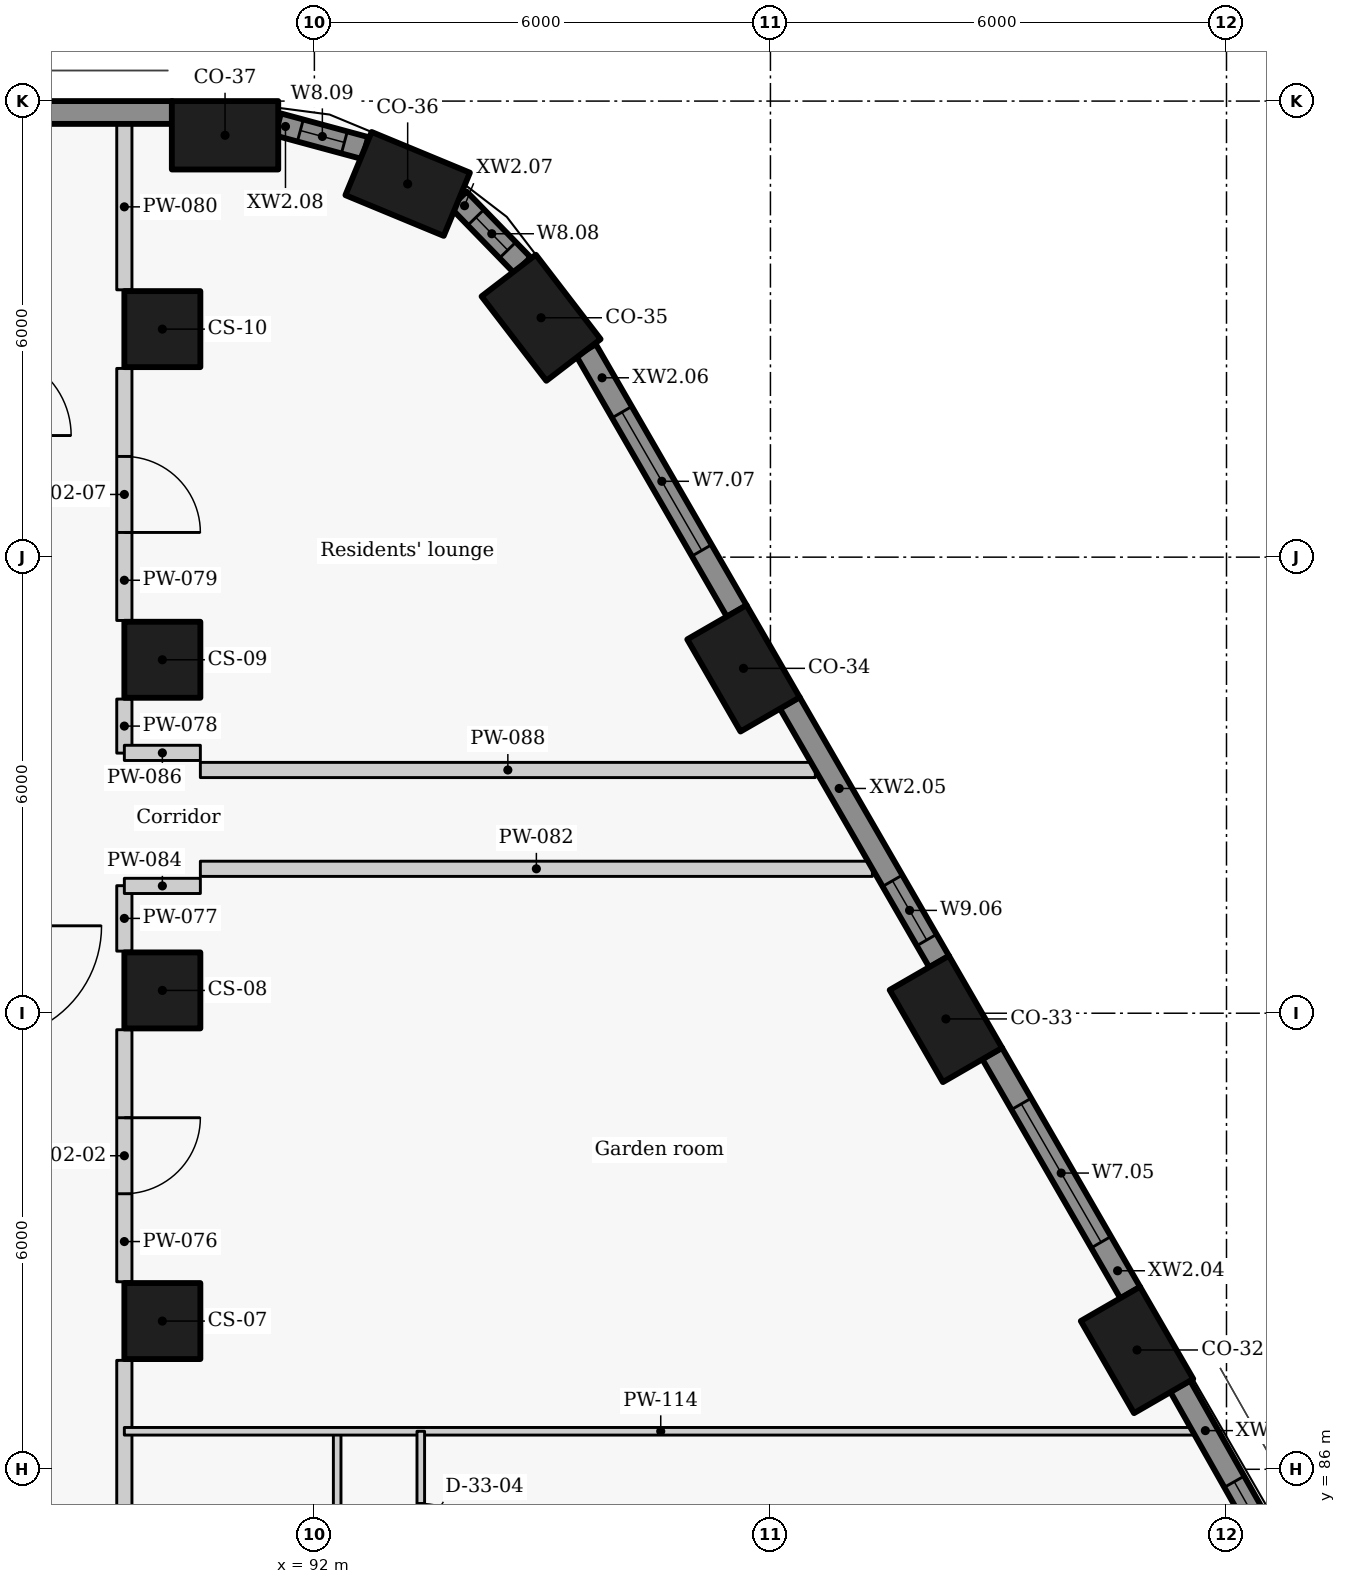
"""IFC4 building model, lengths in metres.
Left out: names, types, materials, properties, quantities, classifications, styles, units other than length and angle.
Written with IfcOpenShell. Run it as: python <this file> out.ifc"""

import sys

from ifc_helpers import new_model, si_unit, direction, frame, frame_2d, origin, origin_2d, place, context, subcontext, project, spatial, rectangle, extrude, element, fill, save


model = new_model("IFC4")
c1 = context("Model", 3, precision=1e-05, world=origin(), true_north=direction((0.0, 1.0)))
c2 = subcontext(c1, "Body", "Model", "MODEL_VIEW")
j1 = project(units=[si_unit("LENGTHUNIT", "METRE"), si_unit("PLANEANGLEUNIT", "RADIAN")], contexts=[c1])
p1 = place(None, origin())
s1 = spatial("IfcSite", under=j1, at=p1, CompositionType="ELEMENT")
p2 = place(p1, origin())
s2 = spatial("IfcBuilding", under=s1, at=p2, CompositionType="ELEMENT")
p3 = place(p2, frame((0.0, 0.0, 97.5)))
s3 = spatial("IfcBuildingStorey", under=s2, at=p3, CompositionType="ELEMENT", Elevation=97.5)
for number, where, z_axis, x_axis in (
    (1, (102.823, 87.57, 0.0), (0.0, 0.0, 1.0), (-0.5, 0.866, 0.0)),
    (2, (100.308, 91.925, 0.0), (0.0, 0.0, 1.0), (-0.5, 0.866, 0.0)),
    (3, (97.646, 96.537, 0.0), (0.0, 0.0, 1.0), (-0.5, 0.866, 0.0)),
    (4, (94.982, 101.149, 0.0), (0.0, 0.0, 1.0), (-0.609, 0.793, 0.0)),
    (5, (93.227, 102.91, 0.0), (0.0, 0.0, 1.0), (-0.924, 0.383, 0.0)),
    (6, (90.825, 103.55, 0.0), (0.0, 0.0, 1.0), (-1.0, 0.0, 0.0)),
):
    element("IfcColumn", number, at=place(p3, frame(where, z_axis=z_axis, x_axis=x_axis)), inside=s3, PredefinedType="COLUMN", context=c2, shape_type="SweptSolid", body=[
        extrude(rectangle(XDim=1.4, YDim=0.9, at=origin_2d()), origin(), (0.0, 0.0, 1.0), 3.3),
    ])
for number, where, z_axis, x_axis in (
    (7, (90.0, 87.95, 0.0), (0.0, 0.0, 1.0), (0.0, 1.0, 0.0)),
    (8, (90.0, 92.3, 0.0), (0.0, 0.0, 1.0), (0.0, 1.0, 0.0)),
    (9, (90.0, 96.65, 0.0), (0.0, 0.0, 1.0), (0.0, 1.0, 0.0)),
    (10, (90.0, 101.0, 0.0), (0.0, 0.0, 1.0), (0.0, 1.0, 0.0)),
):
    element("IfcColumn", number, at=place(p3, frame(where, z_axis=z_axis, x_axis=x_axis)), inside=s3, PredefinedType="COLUMN", context=c2, shape_type="SweptSolid", body=[
        extrude(rectangle(XDim=1.0, YDim=1.0, at=origin_2d()), origin(), (0.0, 0.0, 1.0), 3.3),
    ])
p4 = place(p3, frame((106.186, 82.153, 0.0), z_axis=(0.0, 0.0, 1.0), x_axis=(-0.492456858874, 0.870336855561, 0.0)))
e11 = element("IfcWall", 11, at=p4, inside=s3, PredefinedType="SOLIDWALL", context=c2, shape_type="SweptSolid", body=[
    extrude(rectangle(XDim=5.677, YDim=0.3, at=frame_2d((2.838, 0.0))), origin(), (0.0, 0.0, 1.0), 2.425),
])
p5 = place(p4, frame((0.763, 0.0, 0.9)))
e12 = element("IfcOpeningElement", 12, at=p5, cuts=e11, PredefinedType="OPENING", context=c2, shape_type="SweptSolid", body=[
    extrude(rectangle(XDim=0.9, YDim=1.1, at=frame_2d((0.45, 0.55))), frame((0.0, 0.16, 0.0), z_axis=(0.0, -1.0, 0.0), x_axis=(1.0, 0.0, 0.0)), (0.0, 0.0, 1.0), 0.32),
])
p6 = place(p4, frame((2.732, 0.0, 0.9)))
e13 = element("IfcOpeningElement", 13, at=p6, cuts=e11, PredefinedType="OPENING", context=c2, shape_type="SweptSolid", body=[
    extrude(rectangle(XDim=1.5, YDim=1.1, at=frame_2d((0.75, 0.55))), frame((0.0, 0.16, 0.0), z_axis=(0.0, -1.0, 0.0), x_axis=(1.0, 0.0, 0.0)), (0.0, 0.0, 1.0), 0.32),
])
p7 = place(p3, frame((102.735, 88.323, 0.0), z_axis=(0.0, 0.0, 1.0), x_axis=(-0.500009139881, 0.866020126807, 0.0)))
e14 = element("IfcWall", 14, at=p7, inside=s3, PredefinedType="SOLIDWALL", context=c2, shape_type="SweptSolid", body=[
    extrude(rectangle(XDim=3.637, YDim=0.3, at=frame_2d((1.818, 0.0))), origin(), (0.0, 0.0, 1.0), 2.425),
])
p8 = place(p7, frame((0.768, 0.0, 0.9)))
e15 = element("IfcOpeningElement", 15, at=p8, cuts=e14, PredefinedType="OPENING", context=c2, shape_type="SweptSolid", body=[
    extrude(rectangle(XDim=2.1, YDim=1.1, at=frame_2d((1.05, 0.55))), frame((0.0, 0.16, 0.0), z_axis=(0.0, -1.0, 0.0), x_axis=(1.0, 0.0, 0.0)), (0.0, 0.0, 1.0), 0.32),
])
p9 = place(p3, frame((100.22, 92.677, 0.0), z_axis=(0.0, 0.0, 1.0), x_axis=(-0.499957037901, 0.866050206543, 0.0)))
e16 = element("IfcWall", 16, at=p9, inside=s3, PredefinedType="SOLIDWALL", context=c2, shape_type="SweptSolid", body=[
    extrude(rectangle(XDim=3.934, YDim=0.3, at=frame_2d((1.967, 0.0))), origin(), (0.0, 0.0, 1.0), 2.425),
])
p10 = place(p9, frame((0.33, 0.0, 0.9)))
e17 = element("IfcOpeningElement", 17, at=p10, cuts=e16, PredefinedType="OPENING", context=c2, shape_type="SweptSolid", body=[
    extrude(rectangle(XDim=0.9, YDim=1.1, at=frame_2d((0.45, 0.55))), frame((0.0, 0.16, 0.0), z_axis=(0.0, -1.0, 0.0), x_axis=(1.0, 0.0, 0.0)), (0.0, 0.0, 1.0), 0.32),
])
p11 = place(p3, frame((97.557, 97.29, 0.0), z_axis=(0.0, 0.0, 1.0), x_axis=(-0.500043828347, 0.866000097998, 0.0)))
e18 = element("IfcWall", 18, at=p11, inside=s3, PredefinedType="SOLIDWALL", context=c2, shape_type="SweptSolid", body=[
    extrude(rectangle(XDim=3.968, YDim=0.3, at=frame_2d((1.984, 0.0))), origin(), (0.0, 0.0, 1.0), 2.425),
])
p12 = place(p11, frame((0.922, 0.0, 0.9)))
e19 = element("IfcOpeningElement", 19, at=p12, cuts=e18, PredefinedType="OPENING", context=c2, shape_type="SweptSolid", body=[
    extrude(rectangle(XDim=2.1, YDim=1.1, at=frame_2d((1.05, 0.55))), frame((0.0, 0.16, 0.0), z_axis=(0.0, -1.0, 0.0), x_axis=(1.0, 0.0, 0.0)), (0.0, 0.0, 1.0), 0.32),
])
p13 = place(p3, frame((94.738, 101.839, 0.0), z_axis=(0.0, 0.0, 1.0), x_axis=(-0.697032216592, 0.717039809936, 0.0)))
e20 = element("IfcWall", 20, at=p13, inside=s3, PredefinedType="SOLIDWALL", context=c2, shape_type="SweptSolid", body=[
    extrude(rectangle(XDim=1.208, YDim=0.3, at=frame_2d((0.604, 0.0))), origin(), (0.0, 0.0, 1.0), 2.425),
])
p14 = place(p13, frame((0.279, 0.0, 0.9)))
e21 = element("IfcOpeningElement", 21, at=p14, cuts=e20, PredefinedType="OPENING", context=c2, shape_type="SweptSolid", body=[
    extrude(rectangle(XDim=0.6, YDim=1.1, at=frame_2d((0.3, 0.55))), frame((0.0, 0.16, 0.0), z_axis=(0.0, -1.0, 0.0), x_axis=(1.0, 0.0, 0.0)), (0.0, 0.0, 1.0), 0.32),
])
p15 = place(p3, frame((92.669, 103.382, 0.0), z_axis=(0.0, 0.0, 1.0), x_axis=(-0.965278131029, 0.261224290136, 0.0)))
e22 = element("IfcWall", 22, at=p15, inside=s3, PredefinedType="SOLIDWALL", context=c2, shape_type="SweptSolid", body=[
    extrude(rectangle(XDim=1.19, YDim=0.3, at=frame_2d((0.595, 0.0))), origin(), (0.0, 0.0, 1.0), 2.425),
])
p16 = place(p15, frame((0.285, 0.0, 0.9)))
e23 = element("IfcOpeningElement", 23, at=p16, cuts=e22, PredefinedType="OPENING", context=c2, shape_type="SweptSolid", body=[
    extrude(rectangle(XDim=0.6, YDim=1.1, at=frame_2d((0.3, 0.55))), frame((0.0, 0.16, 0.0), z_axis=(0.0, -1.0, 0.0), x_axis=(1.0, 0.0, 0.0)), (0.0, 0.0, 1.0), 0.32),
])
p17 = place(p3, frame((90.129, 103.85, 0.0), z_axis=(0.0, 0.0, 1.0), x_axis=(-1.0, 0.0, 0.0)))
e24 = element("IfcWall", 24, at=p17, inside=s3, PredefinedType="SOLIDWALL", context=c2, shape_type="SweptSolid", body=[
    extrude(rectangle(XDim=20.291, YDim=0.3, at=frame_2d((10.146, 0.0))), origin(), (0.0, 0.0, 1.0), 2.425),
])
p18 = place(p3, frame((89.5, 83.167, 0.0), z_axis=(0.0, 0.0, 1.0), x_axis=(0.0, 1.0, 0.0)))
e25 = element("IfcWall", 25, at=p18, inside=s3, PredefinedType="PARTITIONING", context=c2, shape_type="SweptSolid", body=[
    extrude(rectangle(XDim=4.266, YDim=0.2, at=frame_2d((2.133, 0.0))), origin(), (0.0, 0.0, 1.0), 3.025),
])
p19 = place(p3, frame((89.5, 91.783, 0.0), z_axis=(0.0, 0.0, 1.0), x_axis=(0.0, -1.0, 0.0)))
e26 = element("IfcWall", 26, at=p19, inside=s3, PredefinedType="PARTITIONING", context=c2, shape_type="SweptSolid", body=[
    extrude(rectangle(XDim=3.316, YDim=0.2, at=frame_2d((1.658, 0.0))), origin(), (0.0, 0.0, 1.0), 3.025),
])
p20 = place(p19, frame((1.158, 0.0, 0.0)))
e27 = element("IfcOpeningElement", 27, at=p20, cuts=e26, PredefinedType="OPENING", context=c2, shape_type="SweptSolid", body=[
    extrude(rectangle(XDim=1.0, YDim=2.1, at=frame_2d((0.5, 1.05))), frame((0.0, 0.11, 0.0), z_axis=(0.0, -1.0, 0.0), x_axis=(1.0, 0.0, 0.0)), (0.0, 0.0, 1.0), 0.22),
])
p21 = place(p3, frame((89.5, 92.817, 0.0), z_axis=(0.0, 0.0, 1.0), x_axis=(0.0, 1.0, 0.0)))
e28 = element("IfcWall", 28, at=p21, inside=s3, PredefinedType="PARTITIONING", context=c2, shape_type="SweptSolid", body=[
    extrude(rectangle(XDim=0.861, YDim=0.2, at=frame_2d((0.431, 0.0))), origin(), (0.0, 0.0, 1.0), 3.025),
])
p22 = place(p3, frame((89.5, 95.422, 0.0), z_axis=(0.0, 0.0, 1.0), x_axis=(0.0, 1.0, 0.0)))
e29 = element("IfcWall", 29, at=p22, inside=s3, PredefinedType="PARTITIONING", context=c2, shape_type="SweptSolid", body=[
    extrude(rectangle(XDim=0.711, YDim=0.2, at=frame_2d((0.355, 0.0))), origin(), (0.0, 0.0, 1.0), 3.025),
])
p23 = place(p3, frame((89.5, 100.483, 0.0), z_axis=(0.0, 0.0, 1.0), x_axis=(0.0, -1.0, 0.0)))
e30 = element("IfcWall", 30, at=p23, inside=s3, PredefinedType="PARTITIONING", context=c2, shape_type="SweptSolid", body=[
    extrude(rectangle(XDim=3.316, YDim=0.2, at=frame_2d((1.658, 0.0))), origin(), (0.0, 0.0, 1.0), 3.025),
])
p24 = place(p23, frame((1.158, 0.0, 0.0)))
e31 = element("IfcOpeningElement", 31, at=p24, cuts=e30, PredefinedType="OPENING", context=c2, shape_type="SweptSolid", body=[
    extrude(rectangle(XDim=1.0, YDim=2.1, at=frame_2d((0.5, 1.05))), frame((0.0, 0.11, 0.0), z_axis=(0.0, -1.0, 0.0), x_axis=(1.0, 0.0, 0.0)), (0.0, 0.0, 1.0), 0.22),
])
p25 = place(p3, frame((89.5, 101.517, 0.0), z_axis=(0.0, 0.0, 1.0), x_axis=(0.0, 1.0, 0.0)))
e32 = element("IfcWall", 32, at=p25, inside=s3, PredefinedType="PARTITIONING", context=c2, shape_type="SweptSolid", body=[
    extrude(rectangle(XDim=2.183, YDim=0.2, at=frame_2d((1.091, 0.0))), origin(), (0.0, 0.0, 1.0), 3.025),
])
p26 = place(p3, frame((90.5, 93.9, 0.0), z_axis=(0.0, 0.0, 1.0), x_axis=(1.0, 0.0, 0.0)))
e33 = element("IfcWall", 33, at=p26, inside=s3, PredefinedType="PARTITIONING", context=c2, shape_type="SweptSolid", body=[
    extrude(rectangle(XDim=8.841, YDim=0.2, at=frame_2d((4.421, 0.0))), origin(), (0.0, 0.0, 1.0), 2.405),
])
for number, where, z_axis, x_axis in (
    (34, (89.5, 93.675, 0.0), (0.0, 0.0, 1.0), (1.0, 0.0, 0.0)),
    (35, (89.5, 95.425, 0.0), (0.0, 0.0, 1.0), (1.0, 0.0, 0.0)),
):
    element("IfcWall", number, at=place(p3, frame(where, z_axis=z_axis, x_axis=x_axis)), inside=s3, PredefinedType="PARTITIONING", context=c2, shape_type="SweptSolid", body=[
        extrude(rectangle(XDim=1.0, YDim=0.2, at=frame_2d((0.5, 0.0))), origin(), (0.0, 0.0, 1.0), 2.505),
    ])
p27 = place(p3, frame((90.5, 95.2, 0.0), z_axis=(0.0, 0.0, 1.0), x_axis=(1.0, 0.0, 0.0)))
e36 = element("IfcWall", 36, at=p27, inside=s3, PredefinedType="PARTITIONING", context=c2, shape_type="SweptSolid", body=[
    extrude(rectangle(XDim=8.091, YDim=0.2, at=frame_2d((4.045, 0.0))), origin(), (0.0, 0.0, 1.0), 2.405),
])
p28 = place(p3, frame((92.3, 79.5, 0.0), z_axis=(0.0, 0.0, 1.0), x_axis=(0.0, 1.0, 0.0)))
e37 = element("IfcWall", 37, at=p28, inside=s3, PredefinedType="PARTITIONING", context=c2, shape_type="SweptSolid", body=[
    extrude(rectangle(XDim=7.0, YDim=0.1, at=frame_2d((3.5, 0.0))), origin(), (0.0, 0.0, 1.0), 3.025),
])
p29 = place(p28, frame((1.166, 0.0, 0.0)))
e38 = element("IfcOpeningElement", 38, at=p29, cuts=e37, PredefinedType="OPENING", context=c2, shape_type="SweptSolid", body=[
    extrude(rectangle(XDim=0.85, YDim=2.1, at=frame_2d((0.425, 1.05))), frame((0.0, 0.06, 0.0), z_axis=(0.0, -1.0, 0.0), x_axis=(1.0, 0.0, 0.0)), (0.0, 0.0, 1.0), 0.12),
])
p30 = place(p28, frame((4.641, 0.0, 0.0)))
e39 = element("IfcOpeningElement", 39, at=p30, cuts=e37, PredefinedType="OPENING", context=c2, shape_type="SweptSolid", body=[
    extrude(rectangle(XDim=0.9, YDim=2.1, at=frame_2d((0.45, 1.05))), frame((0.0, 0.06, 0.0), z_axis=(0.0, -1.0, 0.0), x_axis=(1.0, 0.0, 0.0)), (0.0, 0.0, 1.0), 0.12),
])
p31 = place(p3, frame((89.5, 86.5, 0.0), z_axis=(0.0, 0.0, 1.0), x_axis=(1.0, 0.0, 0.0)))
e40 = element("IfcWall", 40, at=p31, inside=s3, PredefinedType="PARTITIONING", context=c2, shape_type="SweptSolid", body=[
    extrude(rectangle(XDim=14.114, YDim=0.1, at=frame_2d((7.057, 0.0))), origin(), (0.0, 0.0, 1.0), 2.405),
])
p32 = place(p3, frame((93.4, 86.5, 0.0), z_axis=(0.0, 0.0, 1.0), x_axis=(0.0, -1.0, 0.0)))
e41 = element("IfcWall", 41, at=p32, inside=s3, PredefinedType="PARTITIONING", context=c2, shape_type="SweptSolid", body=[
    extrude(rectangle(XDim=9.6, YDim=0.1, at=frame_2d((4.8, 0.0))), origin(), (0.0, 0.0, 1.0), 3.025),
])
p33 = place(p32, frame((7.75, 0.0, 0.0)))
e42 = element("IfcOpeningElement", 42, at=p33, cuts=e41, PredefinedType="OPENING", context=c2, shape_type="SweptSolid", body=[
    extrude(rectangle(XDim=0.9, YDim=2.1, at=frame_2d((0.45, 1.05))), frame((0.0, 0.06, 0.0), z_axis=(0.0, -1.0, 0.0), x_axis=(1.0, 0.0, 0.0)), (0.0, 0.0, 1.0), 0.12),
])
p34 = place(p32, frame((4.35, 0.0, 0.0)))
e43 = element("IfcOpeningElement", 43, at=p34, cuts=e41, PredefinedType="OPENING", context=c2, shape_type="SweptSolid", body=[
    extrude(rectangle(XDim=0.9, YDim=2.1, at=frame_2d((0.45, 1.05))), frame((0.0, 0.06, 0.0), z_axis=(0.0, -1.0, 0.0), x_axis=(1.0, 0.0, 0.0)), (0.0, 0.0, 1.0), 0.12),
])
p35 = place(p32, frame((0.95, 0.0, 0.0)))
e44 = element("IfcOpeningElement", 44, at=p35, cuts=e41, PredefinedType="OPENING", context=c2, shape_type="SweptSolid", body=[
    extrude(rectangle(XDim=0.9, YDim=2.1, at=frame_2d((0.45, 1.05))), frame((0.0, 0.06, 0.0), z_axis=(0.0, -1.0, 0.0), x_axis=(1.0, 0.0, 0.0)), (0.0, 0.0, 1.0), 0.12),
])
p36 = place(p6, origin())
e45 = element("IfcWindow", 45, at=p36, inside=s3, PartitioningType="SINGLE_PANEL", PredefinedType="WINDOW", context=c2, shape_type="SweptSolid", body=[
    extrude(rectangle(XDim=1.5, YDim=1.1, at=frame_2d((0.75, 0.55))), frame((0.0, 0.03, 0.0), z_axis=(0.0, -1.0, 0.0), x_axis=(1.0, 0.0, 0.0)), (0.0, 0.0, 1.0), 0.06),
])
fill(e13, e45)
p37 = place(p8, origin())
e46 = element("IfcWindow", 46, at=p37, inside=s3, PartitioningType="SINGLE_PANEL", PredefinedType="WINDOW", context=c2, shape_type="SweptSolid", body=[
    extrude(rectangle(XDim=2.1, YDim=1.1, at=frame_2d((1.05, 0.55))), frame((0.0, 0.03, 0.0), z_axis=(0.0, -1.0, 0.0), x_axis=(1.0, 0.0, 0.0)), (0.0, 0.0, 1.0), 0.06),
])
fill(e15, e46)
p38 = place(p10, origin())
e47 = element("IfcWindow", 47, at=p38, inside=s3, PartitioningType="SINGLE_PANEL", PredefinedType="WINDOW", context=c2, shape_type="SweptSolid", body=[
    extrude(rectangle(XDim=0.9, YDim=1.1, at=frame_2d((0.45, 0.55))), frame((0.0, 0.03, 0.0), z_axis=(0.0, -1.0, 0.0), x_axis=(1.0, 0.0, 0.0)), (0.0, 0.0, 1.0), 0.06),
])
fill(e17, e47)
p39 = place(p12, origin())
e48 = element("IfcWindow", 48, at=p39, inside=s3, PartitioningType="SINGLE_PANEL", PredefinedType="WINDOW", context=c2, shape_type="SweptSolid", body=[
    extrude(rectangle(XDim=2.1, YDim=1.1, at=frame_2d((1.05, 0.55))), frame((0.0, 0.03, 0.0), z_axis=(0.0, -1.0, 0.0), x_axis=(1.0, 0.0, 0.0)), (0.0, 0.0, 1.0), 0.06),
])
fill(e19, e48)
p40 = place(p14, origin())
e49 = element("IfcWindow", 49, at=p40, inside=s3, PartitioningType="SINGLE_PANEL", PredefinedType="WINDOW", context=c2, shape_type="SweptSolid", body=[
    extrude(rectangle(XDim=0.6, YDim=1.1, at=frame_2d((0.3, 0.55))), frame((0.0, 0.03, 0.0), z_axis=(0.0, -1.0, 0.0), x_axis=(1.0, 0.0, 0.0)), (0.0, 0.0, 1.0), 0.06),
])
fill(e21, e49)
p41 = place(p16, origin())
e50 = element("IfcWindow", 50, at=p41, inside=s3, PartitioningType="SINGLE_PANEL", PredefinedType="WINDOW", context=c2, shape_type="SweptSolid", body=[
    extrude(rectangle(XDim=0.6, YDim=1.1, at=frame_2d((0.3, 0.55))), frame((0.0, 0.03, 0.0), z_axis=(0.0, -1.0, 0.0), x_axis=(1.0, 0.0, 0.0)), (0.0, 0.0, 1.0), 0.06),
])
fill(e23, e50)
p42 = place(p20, origin())
e51 = element("IfcDoor", 51, at=p42, inside=s3, OperationType="SINGLE_SWING_LEFT", PredefinedType="DOOR", context=c2, shape_type="SweptSolid", body=[
    extrude(rectangle(XDim=1.0, YDim=2.1, at=frame_2d((0.5, 1.05))), frame((0.0, 0.025, 0.0), z_axis=(0.0, -1.0, 0.0), x_axis=(1.0, 0.0, 0.0)), (0.0, 0.0, 1.0), 0.05),
])
fill(e27, e51)
p43 = place(p24, origin())
e52 = element("IfcDoor", 52, at=p43, inside=s3, OperationType="SINGLE_SWING_RIGHT", PredefinedType="DOOR", context=c2, shape_type="SweptSolid", body=[
    extrude(rectangle(XDim=1.0, YDim=2.1, at=frame_2d((0.5, 1.05))), frame((0.0, 0.025, 0.0), z_axis=(0.0, -1.0, 0.0), x_axis=(1.0, 0.0, 0.0)), (0.0, 0.0, 1.0), 0.05),
])
fill(e31, e52)
save(model, sys.argv[1])
